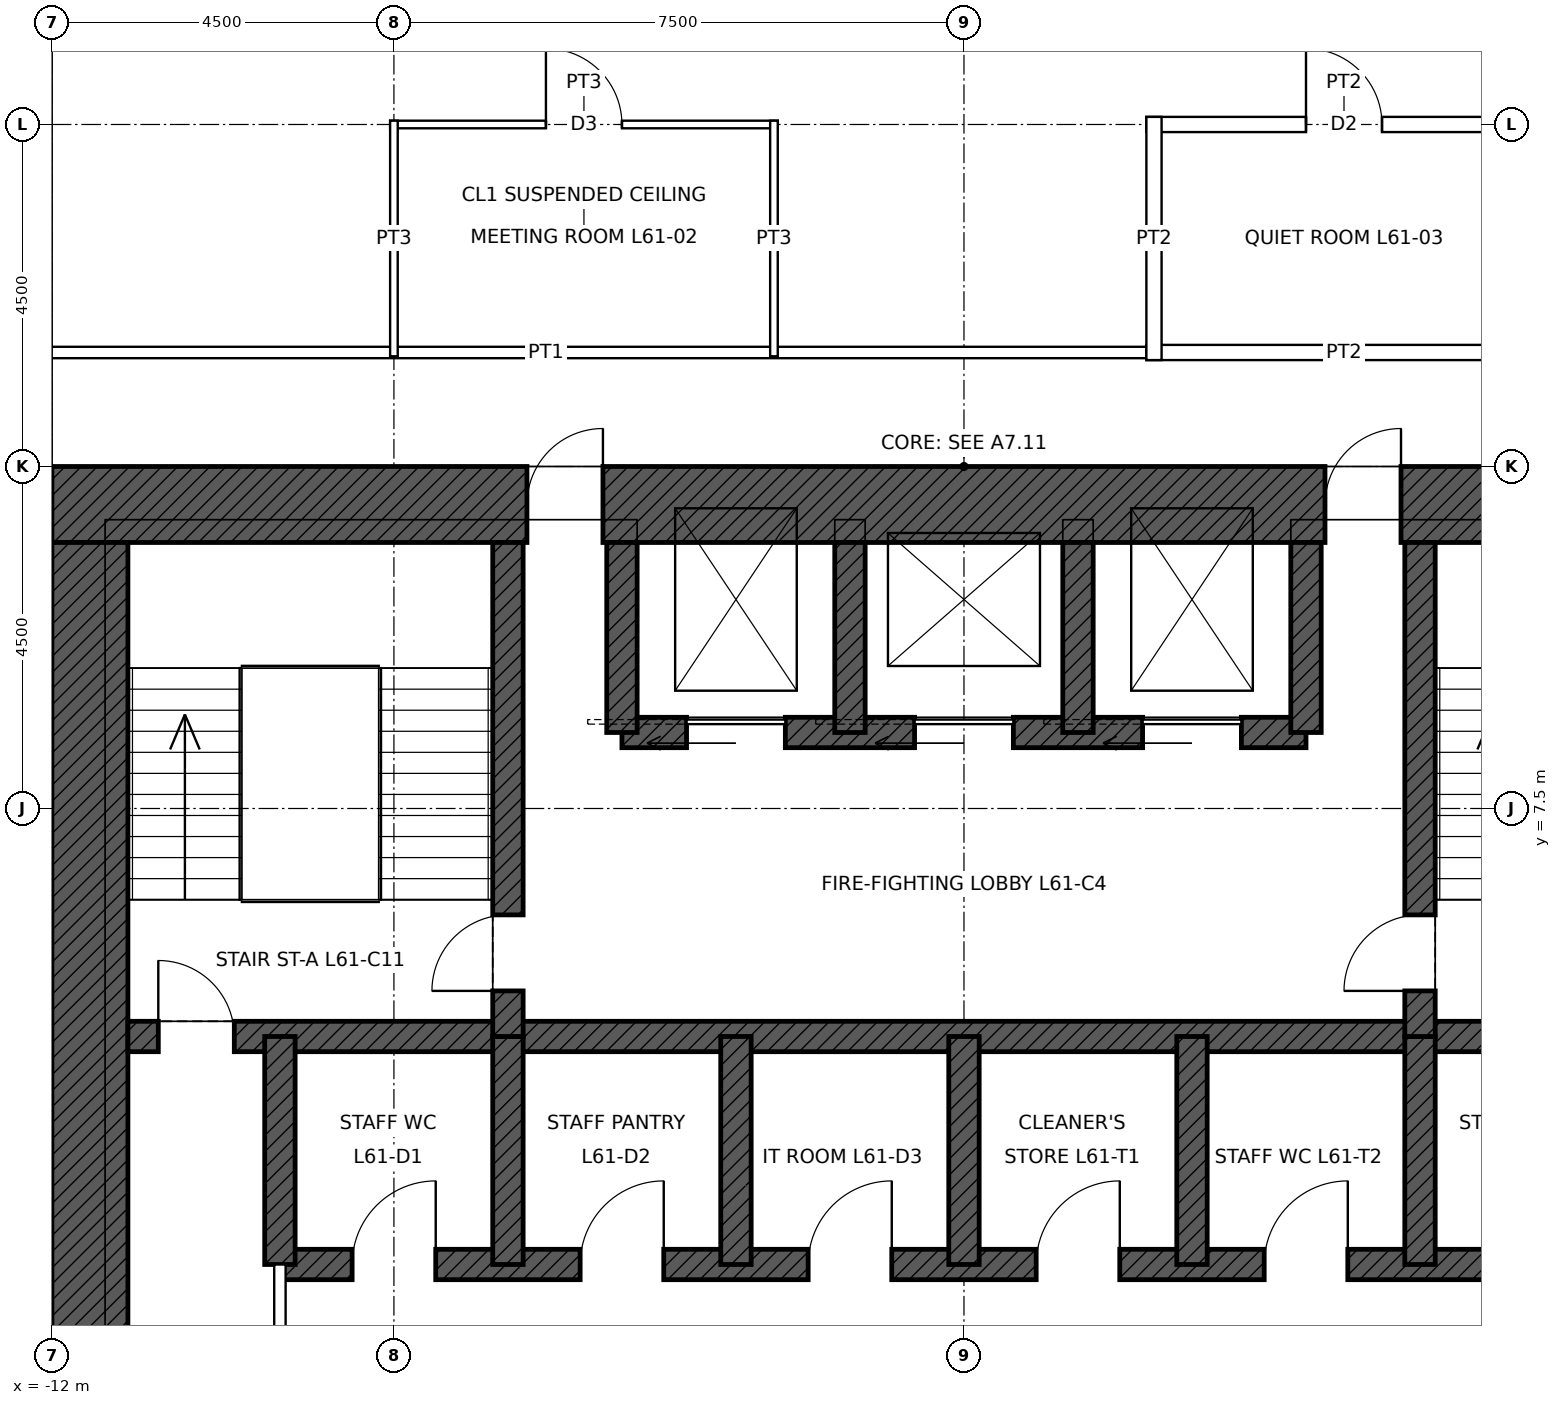
"""IFC4 building model, lengths in metres.
Left out: names, types, materials, properties, quantities, classifications, styles, units other than length and angle.
Written with IfcOpenShell. Run it as: python <this file> out.ifc"""

import sys

from ifc_helpers import new_model, si_unit, direction, frame, frame_2d, origin, place, context, subcontext, project, spatial, rectangle, extrude, element, fill, save


model = new_model("IFC4")
c1 = context("Model", 3, precision=1e-05, world=origin(), true_north=direction((0.0, 1.0)))
c2 = subcontext(c1, "Body", "Model", "MODEL_VIEW")
j1 = project(units=[si_unit("LENGTHUNIT", "METRE"), si_unit("PLANEANGLEUNIT", "RADIAN")], contexts=[c1])
p1 = place(None, origin())
s1 = spatial("IfcSite", under=j1, at=p1, CompositionType="ELEMENT")
p2 = place(p1, origin())
s2 = spatial("IfcBuilding", under=s1, at=p2, CompositionType="ELEMENT")
p3 = place(p2, frame((0.0, 0.0, 279.9)))
s3 = spatial("IfcBuildingStorey", under=s2, at=p3, CompositionType="ELEMENT", Elevation=279.9)
p4 = place(p3, frame((-12.0, 11.5, 0.0), z_axis=(0.0, 0.0, 1.0), x_axis=(1.0, 0.0, 0.0)))
e1 = element("IfcWall", 1, at=p4, inside=s3, PredefinedType="SHEAR", context=c2, shape_type="SweptSolid", body=[
    extrude(rectangle(XDim=24.0, YDim=1.0, at=frame_2d((12.0, 0.0))), origin(), (0.0, 0.0, 1.0), 4.0),
])
p5 = place(p4, frame((6.25, 0.0, 0.0)))
e2 = element("IfcOpeningElement", 2, at=p5, cuts=e1, PredefinedType="OPENING", context=c2, shape_type="SweptSolid", body=[
    extrude(rectangle(XDim=1.0, YDim=2.4, at=frame_2d((0.5, 1.2))), frame((0.0, 0.51, 0.0), z_axis=(0.0, -1.0, 0.0), x_axis=(1.0, 0.0, 0.0)), (0.0, 0.0, 1.0), 1.02),
])
p6 = place(p4, frame((16.75, 0.0, 0.0)))
e3 = element("IfcOpeningElement", 3, at=p6, cuts=e1, PredefinedType="OPENING", context=c2, shape_type="SweptSolid", body=[
    extrude(rectangle(XDim=1.0, YDim=2.4, at=frame_2d((0.5, 1.2))), frame((0.0, 0.51, 0.0), z_axis=(0.0, -1.0, 0.0), x_axis=(1.0, 0.0, 0.0)), (0.0, 0.0, 1.0), 1.02),
])
p7 = place(p3, frame((-11.5, -11.0, 0.0), z_axis=(0.0, 0.0, 1.0), x_axis=(0.0, 1.0, 0.0)))
e4 = element("IfcWall", 4, at=p7, inside=s3, PredefinedType="SHEAR", context=c2, shape_type="SweptSolid", body=[
    extrude(rectangle(XDim=22.0, YDim=1.0, at=frame_2d((11.0, 0.0))), origin(), (0.0, 0.0, 1.0), 4.0),
])
p8 = place(p7, frame((10.5, 0.0, 0.0)))
e5 = element("IfcOpeningElement", 5, at=p8, cuts=e4, PredefinedType="OPENING", context=c2, shape_type="SweptSolid", body=[
    extrude(rectangle(XDim=1.0, YDim=2.4, at=frame_2d((0.5, 1.2))), frame((0.0, 0.51, 0.0), z_axis=(0.0, -1.0, 0.0), x_axis=(1.0, 0.0, 0.0)), (0.0, 0.0, 1.0), 1.02),
])
p9 = place(p3, frame((-11.0, 4.5, 0.0), z_axis=(0.0, 0.0, 1.0), x_axis=(1.0, 0.0, 0.0)))
e6 = element("IfcWall", 6, at=p9, inside=s3, PredefinedType="SHEAR", context=c2, shape_type="SweptSolid", body=[
    extrude(rectangle(XDim=22.0, YDim=0.4, at=frame_2d((11.0, 0.0))), origin(), (0.0, 0.0, 1.0), 4.0),
])
p10 = place(p9, frame((0.4, 0.0, 0.0)))
e7 = element("IfcOpeningElement", 7, at=p10, cuts=e6, PredefinedType="OPENING", context=c2, shape_type="SweptSolid", body=[
    extrude(rectangle(XDim=1.0, YDim=2.1, at=frame_2d((0.5, 1.05))), frame((0.0, 0.21, 0.0), z_axis=(0.0, -1.0, 0.0), x_axis=(1.0, 0.0, 0.0)), (0.0, 0.0, 1.0), 0.42),
])
p11 = place(p9, frame((20.6, 0.0, 0.0)))
e8 = element("IfcOpeningElement", 8, at=p11, cuts=e6, PredefinedType="OPENING", context=c2, shape_type="SweptSolid", body=[
    extrude(rectangle(XDim=1.0, YDim=2.1, at=frame_2d((0.5, 1.05))), frame((0.0, 0.21, 0.0), z_axis=(0.0, -1.0, 0.0), x_axis=(1.0, 0.0, 0.0)), (0.0, 0.0, 1.0), 0.42),
])
p12 = place(p3, frame((-9.0, 1.5, 0.0), z_axis=(0.0, 0.0, 1.0), x_axis=(1.0, 0.0, 0.0)))
e9 = element("IfcWall", 9, at=p12, inside=s3, PredefinedType="SHEAR", context=c2, shape_type="SweptSolid", body=[
    extrude(rectangle(XDim=18.0, YDim=0.4, at=frame_2d((9.0, 0.0))), origin(), (0.0, 0.0, 1.0), 4.0),
])
p13 = place(p12, frame((0.95, 0.0, 0.0)))
e10 = element("IfcOpeningElement", 10, at=p13, cuts=e9, PredefinedType="OPENING", context=c2, shape_type="SweptSolid", body=[
    extrude(rectangle(XDim=1.1, YDim=2.1, at=frame_2d((0.55, 1.05))), frame((0.0, 0.21, 0.0), z_axis=(0.0, -1.0, 0.0), x_axis=(1.0, 0.0, 0.0)), (0.0, 0.0, 1.0), 0.42),
])
p14 = place(p12, frame((3.95, 0.0, 0.0)))
e11 = element("IfcOpeningElement", 11, at=p14, cuts=e9, PredefinedType="OPENING", context=c2, shape_type="SweptSolid", body=[
    extrude(rectangle(XDim=1.1, YDim=2.1, at=frame_2d((0.55, 1.05))), frame((0.0, 0.21, 0.0), z_axis=(0.0, -1.0, 0.0), x_axis=(1.0, 0.0, 0.0)), (0.0, 0.0, 1.0), 0.42),
])
p15 = place(p12, frame((6.95, 0.0, 0.0)))
e12 = element("IfcOpeningElement", 12, at=p15, cuts=e9, PredefinedType="OPENING", context=c2, shape_type="SweptSolid", body=[
    extrude(rectangle(XDim=1.1, YDim=2.1, at=frame_2d((0.55, 1.05))), frame((0.0, 0.21, 0.0), z_axis=(0.0, -1.0, 0.0), x_axis=(1.0, 0.0, 0.0)), (0.0, 0.0, 1.0), 0.42),
])
p16 = place(p12, frame((9.95, 0.0, 0.0)))
e13 = element("IfcOpeningElement", 13, at=p16, cuts=e9, PredefinedType="OPENING", context=c2, shape_type="SweptSolid", body=[
    extrude(rectangle(XDim=1.1, YDim=2.1, at=frame_2d((0.55, 1.05))), frame((0.0, 0.21, 0.0), z_axis=(0.0, -1.0, 0.0), x_axis=(1.0, 0.0, 0.0)), (0.0, 0.0, 1.0), 0.42),
])
p17 = place(p12, frame((12.95, 0.0, 0.0)))
e14 = element("IfcOpeningElement", 14, at=p17, cuts=e9, PredefinedType="OPENING", context=c2, shape_type="SweptSolid", body=[
    extrude(rectangle(XDim=1.1, YDim=2.1, at=frame_2d((0.55, 1.05))), frame((0.0, 0.21, 0.0), z_axis=(0.0, -1.0, 0.0), x_axis=(1.0, 0.0, 0.0)), (0.0, 0.0, 1.0), 0.42),
])
p18 = place(p12, frame((15.95, 0.0, 0.0)))
e15 = element("IfcOpeningElement", 15, at=p18, cuts=e9, PredefinedType="OPENING", context=c2, shape_type="SweptSolid", body=[
    extrude(rectangle(XDim=1.1, YDim=2.1, at=frame_2d((0.55, 1.05))), frame((0.0, 0.21, 0.0), z_axis=(0.0, -1.0, 0.0), x_axis=(1.0, 0.0, 0.0)), (0.0, 0.0, 1.0), 0.42),
])
p19 = place(p3, frame((-4.5, 8.5, 0.0), z_axis=(0.0, 0.0, 1.0), x_axis=(1.0, 0.0, 0.0)))
e16 = element("IfcWall", 16, at=p19, inside=s3, PredefinedType="SHEAR", context=c2, shape_type="SweptSolid", body=[
    extrude(rectangle(XDim=9.0, YDim=0.4, at=frame_2d((4.5, 0.0))), origin(), (0.0, 0.0, 1.0), 4.0),
])
p20 = place(p19, frame((0.85, 0.0, 0.0)))
e17 = element("IfcOpeningElement", 17, at=p20, cuts=e16, PredefinedType="OPENING", context=c2, shape_type="SweptSolid", body=[
    extrude(rectangle(XDim=1.3, YDim=2.4, at=frame_2d((0.65, 1.2))), frame((0.0, 0.21, 0.0), z_axis=(0.0, -1.0, 0.0), x_axis=(1.0, 0.0, 0.0)), (0.0, 0.0, 1.0), 0.42),
])
p21 = place(p19, frame((6.85, 0.0, 0.0)))
e18 = element("IfcOpeningElement", 18, at=p21, cuts=e16, PredefinedType="OPENING", context=c2, shape_type="SweptSolid", body=[
    extrude(rectangle(XDim=1.3, YDim=2.4, at=frame_2d((0.65, 1.2))), frame((0.0, 0.21, 0.0), z_axis=(0.0, -1.0, 0.0), x_axis=(1.0, 0.0, 0.0)), (0.0, 0.0, 1.0), 0.42),
])
p22 = place(p19, frame((3.85, 0.0, 0.0)))
e19 = element("IfcOpeningElement", 19, at=p22, cuts=e16, PredefinedType="OPENING", context=c2, shape_type="SweptSolid", body=[
    extrude(rectangle(XDim=1.3, YDim=2.4, at=frame_2d((0.65, 1.2))), frame((0.0, 0.21, 0.0), z_axis=(0.0, -1.0, 0.0), x_axis=(1.0, 0.0, 0.0)), (0.0, 0.0, 1.0), 0.42),
])
for number, where, z_axis, x_axis in (
    (20, (-9.0, 1.5, 0.0), (0.0, 0.0, 1.0), (0.0, 1.0, 0.0)),
    (21, (-6.0, 1.5, 0.0), (0.0, 0.0, 1.0), (0.0, 1.0, 0.0)),
    (22, (-3.0, 1.5, 0.0), (0.0, 0.0, 1.0), (0.0, 1.0, 0.0)),
    (23, (0.0, 1.5, 0.0), (0.0, 0.0, 1.0), (0.0, 1.0, 0.0)),
    (24, (3.0, 1.5, 0.0), (0.0, 0.0, 1.0), (0.0, 1.0, 0.0)),
    (25, (6.0, 1.5, 0.0), (0.0, 0.0, 1.0), (0.0, 1.0, 0.0)),
):
    element("IfcWall", number, at=place(p3, frame(where, z_axis=z_axis, x_axis=x_axis)), inside=s3, PredefinedType="SHEAR", context=c2, shape_type="SweptSolid", body=[
        extrude(rectangle(XDim=3.0, YDim=0.4, at=frame_2d((1.5, 0.0))), origin(), (0.0, 0.0, 1.0), 4.0),
    ])
p23 = place(p3, frame((-6.0, 4.5, 0.0), z_axis=(0.0, 0.0, 1.0), x_axis=(0.0, 1.0, 0.0)))
e26 = element("IfcWall", 26, at=p23, inside=s3, PredefinedType="SHEAR", context=c2, shape_type="SweptSolid", body=[
    extrude(rectangle(XDim=6.5, YDim=0.4, at=frame_2d((3.25, 0.0))), origin(), (0.0, 0.0, 1.0), 4.0),
])
p24 = place(p23, frame((0.6, 0.0, 0.0)))
e27 = element("IfcOpeningElement", 27, at=p24, cuts=e26, PredefinedType="OPENING", context=c2, shape_type="SweptSolid", body=[
    extrude(rectangle(XDim=1.0, YDim=2.1, at=frame_2d((0.5, 1.05))), frame((0.0, 0.21, 0.0), z_axis=(0.0, -1.0, 0.0), x_axis=(1.0, 0.0, 0.0)), (0.0, 0.0, 1.0), 0.42),
])
p25 = place(p3, frame((6.0, 4.5, 0.0), z_axis=(0.0, 0.0, 1.0), x_axis=(0.0, 1.0, 0.0)))
e28 = element("IfcWall", 28, at=p25, inside=s3, PredefinedType="SHEAR", context=c2, shape_type="SweptSolid", body=[
    extrude(rectangle(XDim=6.5, YDim=0.4, at=frame_2d((3.25, 0.0))), origin(), (0.0, 0.0, 1.0), 4.0),
])
p26 = place(p25, frame((0.6, 0.0, 0.0)))
e29 = element("IfcOpeningElement", 29, at=p26, cuts=e28, PredefinedType="OPENING", context=c2, shape_type="SweptSolid", body=[
    extrude(rectangle(XDim=1.0, YDim=2.1, at=frame_2d((0.5, 1.05))), frame((0.0, 0.21, 0.0), z_axis=(0.0, -1.0, 0.0), x_axis=(1.0, 0.0, 0.0)), (0.0, 0.0, 1.0), 0.42),
])
for number, where, z_axis, x_axis in (
    (30, (-4.5, 8.5, 0.0), (0.0, 0.0, 1.0), (0.0, 1.0, 0.0)),
    (31, (4.5, 8.5, 0.0), (0.0, 0.0, 1.0), (0.0, 1.0, 0.0)),
    (32, (-1.5, 8.5, 0.0), (0.0, 0.0, 1.0), (0.0, 1.0, 0.0)),
    (33, (1.5, 8.5, 0.0), (0.0, 0.0, 1.0), (0.0, 1.0, 0.0)),
):
    element("IfcWall", number, at=place(p3, frame(where, z_axis=z_axis, x_axis=x_axis)), inside=s3, PredefinedType="SHEAR", context=c2, shape_type="SweptSolid", body=[
        extrude(rectangle(XDim=2.5, YDim=0.4, at=frame_2d((1.25, 0.0))), origin(), (0.0, 0.0, 1.0), 4.0),
    ])
p27 = place(p3, frame((-13.575, 13.5, 0.0), z_axis=(0.0, 0.0, 1.0), x_axis=(1.0, 0.0, 0.0)))
e34 = element("IfcWall", 34, at=p27, inside=s3, PredefinedType="PARTITIONING", context=c2, shape_type="SweptSolid", body=[
    extrude(rectangle(XDim=16.15, YDim=0.15, at=frame_2d((8.075, 0.0))), origin(), (0.0, 0.0, 1.0), 3.85),
])
p28 = place(p3, frame((2.4, 13.5, 0.0), z_axis=(0.0, 0.0, 1.0), x_axis=(1.0, 0.0, 0.0)))
e35 = element("IfcWall", 35, at=p28, inside=s3, PredefinedType="PARTITIONING", context=c2, shape_type="SweptSolid", body=[
    extrude(rectangle(XDim=5.2, YDim=0.2, at=frame_2d((2.6, 0.0))), origin(), (0.0, 0.0, 1.0), 3.85),
])
p29 = place(p3, frame((-7.55, 16.5, 0.0), z_axis=(0.0, 0.0, 1.0), x_axis=(1.0, 0.0, 0.0)))
e36 = element("IfcWall", 36, at=p29, inside=s3, PredefinedType="PARTITIONING", context=c2, shape_type="SweptSolid", body=[
    extrude(rectangle(XDim=5.1, YDim=0.1, at=frame_2d((2.55, 0.0))), origin(), (0.0, 0.0, 1.0), 3.85),
])
p30 = place(p29, frame((2.05, 0.0, 0.0)))
e37 = element("IfcOpeningElement", 37, at=p30, cuts=e36, PredefinedType="OPENING", context=c2, shape_type="SweptSolid", body=[
    extrude(rectangle(XDim=1.0, YDim=2.1, at=frame_2d((0.5, 1.05))), frame((0.0, 0.06, 0.0), z_axis=(0.0, -1.0, 0.0), x_axis=(1.0, 0.0, 0.0)), (0.0, 0.0, 1.0), 0.12),
])
p31 = place(p3, frame((2.4, 16.5, 0.0), z_axis=(0.0, 0.0, 1.0), x_axis=(1.0, 0.0, 0.0)))
e38 = element("IfcWall", 38, at=p31, inside=s3, PredefinedType="PARTITIONING", context=c2, shape_type="SweptSolid", body=[
    extrude(rectangle(XDim=5.2, YDim=0.2, at=frame_2d((2.6, 0.0))), origin(), (0.0, 0.0, 1.0), 3.85),
])
p32 = place(p31, frame((2.1, 0.0, 0.0)))
e39 = element("IfcOpeningElement", 39, at=p32, cuts=e38, PredefinedType="OPENING", context=c2, shape_type="SweptSolid", body=[
    extrude(rectangle(XDim=1.0, YDim=2.1, at=frame_2d((0.5, 1.05))), frame((0.0, 0.11, 0.0), z_axis=(0.0, -1.0, 0.0), x_axis=(1.0, 0.0, 0.0)), (0.0, 0.0, 1.0), 0.22),
])
p33 = place(p3, frame((-7.5, 13.45, 0.0), z_axis=(0.0, 0.0, 1.0), x_axis=(0.0, 1.0, 0.0)))
e40 = element("IfcWall", 40, at=p33, inside=s3, PredefinedType="PARTITIONING", context=c2, shape_type="SweptSolid", body=[
    extrude(rectangle(XDim=3.1, YDim=0.1, at=frame_2d((1.55, 0.0))), origin(), (0.0, 0.0, 1.0), 3.243),
])
p34 = place(p3, frame((-2.5, 13.45, 0.0), z_axis=(0.0, 0.0, 1.0), x_axis=(0.0, 1.0, 0.0)))
e41 = element("IfcWall", 41, at=p34, inside=s3, PredefinedType="PARTITIONING", context=c2, shape_type="SweptSolid", body=[
    extrude(rectangle(XDim=3.1, YDim=0.1, at=frame_2d((1.55, 0.0))), origin(), (0.0, 0.0, 1.0), 3.85),
])
p35 = place(p3, frame((2.5, 13.4, 0.0), z_axis=(0.0, 0.0, 1.0), x_axis=(0.0, 1.0, 0.0)))
e42 = element("IfcWall", 42, at=p35, inside=s3, PredefinedType="PARTITIONING", context=c2, shape_type="SweptSolid", body=[
    extrude(rectangle(XDim=3.2, YDim=0.2, at=frame_2d((1.6, 0.0))), origin(), (0.0, 0.0, 1.0), 3.85),
])
p36 = place(p3, frame((-9.0, -1.5, 0.0), z_axis=(0.0, 0.0, 1.0), x_axis=(0.0, 1.0, 0.0)))
e43 = element("IfcWall", 43, at=p36, inside=s3, PredefinedType="PARTITIONING", context=c2, shape_type="SweptSolid", body=[
    extrude(rectangle(XDim=3.0, YDim=0.15, at=frame_2d((1.5, 0.0))), origin(), (0.0, 0.0, 1.0), 3.75),
])
p37 = place(p36, frame((1.0, 0.0, 0.0)))
e44 = element("IfcOpeningElement", 44, at=p37, cuts=e43, PredefinedType="OPENING", context=c2, shape_type="SweptSolid", body=[
    extrude(rectangle(XDim=1.0, YDim=2.4, at=frame_2d((0.5, 1.2))), frame((0.0, 0.085, 0.0), z_axis=(0.0, -1.0, 0.0), x_axis=(1.0, 0.0, 0.0)), (0.0, 0.0, 1.0), 0.17),
])
p38 = place(p10, origin())
e45 = element("IfcDoor", 45, at=p38, inside=s3, OperationType="SINGLE_SWING_LEFT", PredefinedType="DOOR", context=c2, shape_type="SweptSolid", body=[
    extrude(rectangle(XDim=1.0, YDim=2.1, at=frame_2d((0.5, 1.05))), frame((0.0, 0.025, 0.0), z_axis=(0.0, -1.0, 0.0), x_axis=(1.0, 0.0, 0.0)), (0.0, 0.0, 1.0), 0.05),
])
fill(e7, e45)
p39 = place(p24, origin())
e46 = element("IfcDoor", 46, at=p39, inside=s3, OperationType="SINGLE_SWING_LEFT", PredefinedType="DOOR", context=c2, shape_type="SweptSolid", body=[
    extrude(rectangle(XDim=1.0, YDim=2.1, at=frame_2d((0.5, 1.05))), frame((0.0, 0.025, 0.0), z_axis=(0.0, -1.0, 0.0), x_axis=(1.0, 0.0, 0.0)), (0.0, 0.0, 1.0), 0.05),
])
fill(e27, e46)
p40 = place(p26, origin())
e47 = element("IfcDoor", 47, at=p40, inside=s3, OperationType="SINGLE_SWING_LEFT", PredefinedType="DOOR", context=c2, shape_type="SweptSolid", body=[
    extrude(rectangle(XDim=1.0, YDim=2.1, at=frame_2d((0.5, 1.05))), frame((0.0, 0.025, 0.0), z_axis=(0.0, -1.0, 0.0), x_axis=(1.0, 0.0, 0.0)), (0.0, 0.0, 1.0), 0.05),
])
fill(e29, e47)
p41 = place(p5, origin())
e48 = element("IfcDoor", 48, at=p41, inside=s3, OperationType="SINGLE_SWING_RIGHT", PredefinedType="DOOR", context=c2, shape_type="SweptSolid", body=[
    extrude(rectangle(XDim=1.0, YDim=2.4, at=frame_2d((0.5, 1.2))), frame((0.0, 0.485, 0.0), z_axis=(0.0, -1.0, 0.0), x_axis=(1.0, 0.0, 0.0)), (0.0, 0.0, 1.0), 0.05),
])
fill(e2, e48)
p42 = place(p6, origin())
e49 = element("IfcDoor", 49, at=p42, inside=s3, OperationType="SINGLE_SWING_RIGHT", PredefinedType="DOOR", context=c2, shape_type="SweptSolid", body=[
    extrude(rectangle(XDim=1.0, YDim=2.4, at=frame_2d((0.5, 1.2))), frame((0.0, 0.485, 0.0), z_axis=(0.0, -1.0, 0.0), x_axis=(1.0, 0.0, 0.0)), (0.0, 0.0, 1.0), 0.05),
])
fill(e3, e49)
p43 = place(p20, origin())
e50 = element("IfcDoor", 50, at=p43, inside=s3, OperationType="SLIDING_TO_LEFT", PredefinedType="DOOR", context=c2, shape_type="SweptSolid", body=[
    extrude(rectangle(XDim=1.3, YDim=2.4, at=frame_2d((0.65, 1.2))), frame((0.0, 0.025, 0.0), z_axis=(0.0, -1.0, 0.0), x_axis=(1.0, 0.0, 0.0)), (0.0, 0.0, 1.0), 0.05),
])
fill(e17, e50)
p44 = place(p21, origin())
e51 = element("IfcDoor", 51, at=p44, inside=s3, OperationType="SLIDING_TO_LEFT", PredefinedType="DOOR", context=c2, shape_type="SweptSolid", body=[
    extrude(rectangle(XDim=1.3, YDim=2.4, at=frame_2d((0.65, 1.2))), frame((0.0, 0.025, 0.0), z_axis=(0.0, -1.0, 0.0), x_axis=(1.0, 0.0, 0.0)), (0.0, 0.0, 1.0), 0.05),
])
fill(e18, e51)
p45 = place(p22, origin())
e52 = element("IfcDoor", 52, at=p45, inside=s3, OperationType="SLIDING_TO_LEFT", PredefinedType="DOOR", context=c2, shape_type="SweptSolid", body=[
    extrude(rectangle(XDim=1.3, YDim=2.4, at=frame_2d((0.65, 1.2))), frame((0.0, 0.025, 0.0), z_axis=(0.0, -1.0, 0.0), x_axis=(1.0, 0.0, 0.0)), (0.0, 0.0, 1.0), 0.05),
])
fill(e19, e52)
p46 = place(p13, origin())
e53 = element("IfcDoor", 53, at=p46, inside=s3, OperationType="SINGLE_SWING_RIGHT", PredefinedType="DOOR", context=c2, shape_type="SweptSolid", body=[
    extrude(rectangle(XDim=1.1, YDim=2.1, at=frame_2d((0.55, 1.05))), frame((0.0, 0.025, 0.0), z_axis=(0.0, -1.0, 0.0), x_axis=(1.0, 0.0, 0.0)), (0.0, 0.0, 1.0), 0.05),
])
fill(e10, e53)
p47 = place(p14, origin())
e54 = element("IfcDoor", 54, at=p47, inside=s3, OperationType="SINGLE_SWING_RIGHT", PredefinedType="DOOR", context=c2, shape_type="SweptSolid", body=[
    extrude(rectangle(XDim=1.1, YDim=2.1, at=frame_2d((0.55, 1.05))), frame((0.0, 0.025, 0.0), z_axis=(0.0, -1.0, 0.0), x_axis=(1.0, 0.0, 0.0)), (0.0, 0.0, 1.0), 0.05),
])
fill(e11, e54)
p48 = place(p15, origin())
e55 = element("IfcDoor", 55, at=p48, inside=s3, OperationType="SINGLE_SWING_RIGHT", PredefinedType="DOOR", context=c2, shape_type="SweptSolid", body=[
    extrude(rectangle(XDim=1.1, YDim=2.1, at=frame_2d((0.55, 1.05))), frame((0.0, 0.025, 0.0), z_axis=(0.0, -1.0, 0.0), x_axis=(1.0, 0.0, 0.0)), (0.0, 0.0, 1.0), 0.05),
])
fill(e12, e55)
p49 = place(p16, origin())
e56 = element("IfcDoor", 56, at=p49, inside=s3, OperationType="SINGLE_SWING_RIGHT", PredefinedType="DOOR", context=c2, shape_type="SweptSolid", body=[
    extrude(rectangle(XDim=1.1, YDim=2.1, at=frame_2d((0.55, 1.05))), frame((0.0, 0.025, 0.0), z_axis=(0.0, -1.0, 0.0), x_axis=(1.0, 0.0, 0.0)), (0.0, 0.0, 1.0), 0.05),
])
fill(e13, e56)
p50 = place(p17, origin())
e57 = element("IfcDoor", 57, at=p50, inside=s3, OperationType="SINGLE_SWING_RIGHT", PredefinedType="DOOR", context=c2, shape_type="SweptSolid", body=[
    extrude(rectangle(XDim=1.1, YDim=2.1, at=frame_2d((0.55, 1.05))), frame((0.0, 0.025, 0.0), z_axis=(0.0, -1.0, 0.0), x_axis=(1.0, 0.0, 0.0)), (0.0, 0.0, 1.0), 0.05),
])
fill(e14, e57)
p51 = place(p30, origin())
e58 = element("IfcDoor", 58, at=p51, inside=s3, OperationType="SINGLE_SWING_LEFT", PredefinedType="DOOR", context=c2, shape_type="SweptSolid", body=[
    extrude(rectangle(XDim=1.0, YDim=2.1, at=frame_2d((0.5, 1.05))), frame((0.0, 0.025, 0.0), z_axis=(0.0, -1.0, 0.0), x_axis=(1.0, 0.0, 0.0)), (0.0, 0.0, 1.0), 0.05),
])
fill(e37, e58)
p52 = place(p32, origin())
e59 = element("IfcDoor", 59, at=p52, inside=s3, OperationType="SINGLE_SWING_LEFT", PredefinedType="DOOR", context=c2, shape_type="SweptSolid", body=[
    extrude(rectangle(XDim=1.0, YDim=2.1, at=frame_2d((0.5, 1.05))), frame((0.0, 0.025, 0.0), z_axis=(0.0, -1.0, 0.0), x_axis=(1.0, 0.0, 0.0)), (0.0, 0.0, 1.0), 0.05),
])
fill(e39, e59)
save(model, sys.argv[1])
